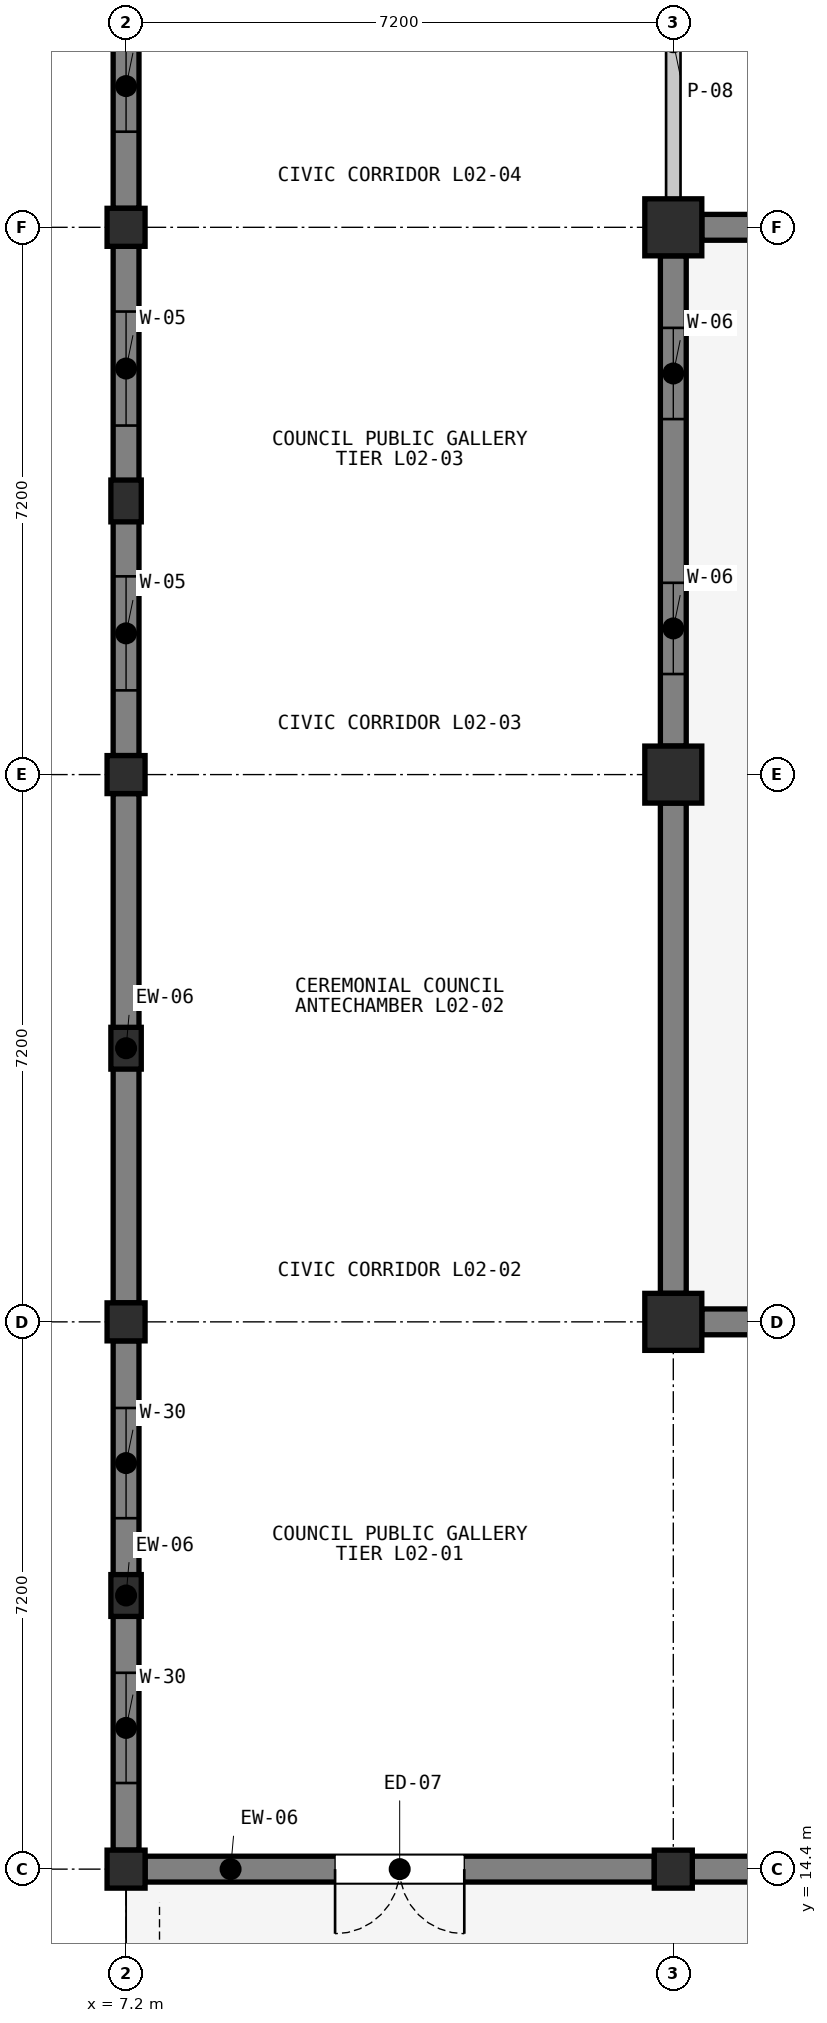
"""IFC4 building model, lengths in metres.
Left out: names, types, materials, properties, quantities, classifications, styles, units other than length and angle.
Written with IfcOpenShell. Run it as: python <this file> out.ifc"""

import sys

from ifc_helpers import new_model, si_unit, direction, frame, frame_2d, origin, origin_2d, place, context, subcontext, project, spatial, rectangle, extrude, element, fill, save


model = new_model("IFC4")
c1 = context("Model", 3, precision=1e-05, world=origin(), true_north=direction((0.0, 1.0)))
c2 = subcontext(c1, "Body", "Model", "MODEL_VIEW")
j1 = project(units=[si_unit("LENGTHUNIT", "METRE"), si_unit("PLANEANGLEUNIT", "RADIAN")], contexts=[c1])
p1 = place(None, origin())
s1 = spatial("IfcSite", under=j1, at=p1, CompositionType="ELEMENT")
p2 = place(p1, origin())
s2 = spatial("IfcBuilding", under=s1, at=p2, CompositionType="ELEMENT")
p3 = place(p2, frame((0.0, 0.0, 5.4)))
s3 = spatial("IfcBuildingStorey", under=s2, at=p3, CompositionType="ELEMENT", Elevation=5.4)
for number, where, z_axis, x_axis in (
    (1, (7.2, 14.4, 0.0), (0.0, 0.0, 1.0), (1.0, 0.0, 0.0)),
    (2, (7.2, 21.6, 0.0), (0.0, 0.0, 1.0), (1.0, 0.0, 0.0)),
    (3, (7.2, 28.8, 0.0), (0.0, 0.0, 1.0), (1.0, 0.0, 0.0)),
    (4, (7.2, 36.0, 0.0), (0.0, 0.0, 1.0), (1.0, 0.0, 0.0)),
    (5, (14.4, 14.4, 0.0), (0.0, 0.0, 1.0), (1.0, 0.0, 0.0)),
):
    element("IfcColumn", number, at=place(p3, frame(where, z_axis=z_axis, x_axis=x_axis)), inside=s3, PredefinedType="COLUMN", context=c2, shape_type="SweptSolid", body=[
        extrude(rectangle(XDim=0.5, YDim=0.5, at=origin_2d()), origin(), (0.0, 0.0, 1.0), 4.5),
    ])
for number, where, z_axis, x_axis in (
    (6, (14.4, 21.6, 0.0), (0.0, 0.0, 1.0), (1.0, 0.0, 0.0)),
    (7, (14.4, 28.8, 0.0), (0.0, 0.0, 1.0), (1.0, 0.0, 0.0)),
    (8, (14.4, 36.0, 0.0), (0.0, 0.0, 1.0), (1.0, 0.0, 0.0)),
):
    element("IfcColumn", number, at=place(p3, frame(where, z_axis=z_axis, x_axis=x_axis)), inside=s3, PredefinedType="COLUMN", context=c2, shape_type="SweptSolid", body=[
        extrude(rectangle(XDim=0.75, YDim=0.75, at=origin_2d()), origin(), (0.0, 0.0, 1.0), 4.5),
    ])
for number, where, z_axis, x_axis in (
    (9, (7.2, 18.0, 0.0), (0.0, 0.0, 1.0), (1.0, 0.0, 0.0)),
    (10, (7.2, 25.2, 0.0), (0.0, 0.0, 1.0), (1.0, 0.0, 0.0)),
    (11, (7.2, 32.4, 0.0), (0.0, 0.0, 1.0), (1.0, 0.0, 0.0)),
):
    element("IfcColumn", number, at=place(p3, frame(where, z_axis=z_axis, x_axis=x_axis)), inside=s3, PredefinedType="PILASTER", context=c2, shape_type="SweptSolid", body=[
        extrude(rectangle(XDim=0.4, YDim=0.55, at=origin_2d()), origin(), (0.0, 0.0, 1.0), 4.5),
    ])
p4 = place(p3, frame((14.15, 14.4, 0.0), z_axis=(0.0, 0.0, 1.0), x_axis=(-1.0, 0.0, 0.0)))
e12 = element("IfcWall", 12, at=p4, inside=s3, PredefinedType="SOLIDWALL", context=c2, shape_type="SweptSolid", body=[
    extrude(rectangle(XDim=6.7, YDim=0.34, at=frame_2d((3.35, 0.0))), origin(), (0.0, 0.0, 1.0), 3.698),
])
p5 = place(p4, frame((2.5, 0.0, 0.0)))
e13 = element("IfcOpeningElement", 13, at=p5, cuts=e12, PredefinedType="OPENING", context=c2, shape_type="SweptSolid", body=[
    extrude(rectangle(XDim=1.7, YDim=2.25, at=frame_2d((0.85, 1.125))), frame((0.0, 0.18, 0.0), z_axis=(0.0, -1.0, 0.0), x_axis=(1.0, 0.0, 0.0)), (0.0, 0.0, 1.0), 0.36),
])
p6 = place(p3, frame((7.2, 14.65, 0.0), z_axis=(0.0, 0.0, 1.0), x_axis=(0.0, 1.0, 0.0)))
e14 = element("IfcWall", 14, at=p6, inside=s3, PredefinedType="SOLIDWALL", context=c2, shape_type="SweptSolid", body=[
    extrude(rectangle(XDim=6.7, YDim=0.34, at=frame_2d((3.35, 0.0))), origin(), (0.0, 0.0, 1.0), 3.767),
])
p7 = place(p6, frame((0.883, 0.0, 0.95)))
e15 = element("IfcOpeningElement", 15, at=p7, cuts=e14, PredefinedType="OPENING", context=c2, shape_type="SweptSolid", body=[
    extrude(rectangle(XDim=1.45, YDim=2.15, at=frame_2d((0.725, 1.075))), frame((0.0, 0.18, 0.0), z_axis=(0.0, -1.0, 0.0), x_axis=(1.0, 0.0, 0.0)), (0.0, 0.0, 1.0), 0.36),
])
p8 = place(p6, frame((4.367, 0.0, 0.95)))
e16 = element("IfcOpeningElement", 16, at=p8, cuts=e14, PredefinedType="OPENING", context=c2, shape_type="SweptSolid", body=[
    extrude(rectangle(XDim=1.45, YDim=2.15, at=frame_2d((0.725, 1.075))), frame((0.0, 0.18, 0.0), z_axis=(0.0, -1.0, 0.0), x_axis=(1.0, 0.0, 0.0)), (0.0, 0.0, 1.0), 0.36),
])
p9 = place(p3, frame((7.2, 21.85, 0.0), z_axis=(0.0, 0.0, 1.0), x_axis=(0.0, 1.0, 0.0)))
e17 = element("IfcWall", 17, at=p9, inside=s3, PredefinedType="SOLIDWALL", context=c2, shape_type="SweptSolid", body=[
    extrude(rectangle(XDim=6.7, YDim=0.34, at=frame_2d((3.35, 0.0))), origin(), (0.0, 0.0, 1.0), 3.767),
])
p10 = place(p3, frame((14.4, 28.425, 0.0), z_axis=(0.0, 0.0, 1.0), x_axis=(0.0, -1.0, 0.0)))
e18 = element("IfcWall", 18, at=p10, inside=s3, PredefinedType="SOLIDWALL", context=c2, shape_type="SweptSolid", body=[
    extrude(rectangle(XDim=6.45, YDim=0.34, at=frame_2d((3.225, 0.0))), origin(), (0.0, 0.0, 1.0), 3.767),
])
p11 = place(p3, frame((7.2, 29.05, 0.0), z_axis=(0.0, 0.0, 1.0), x_axis=(0.0, 1.0, 0.0)))
e19 = element("IfcWall", 19, at=p11, inside=s3, PredefinedType="SOLIDWALL", context=c2, shape_type="SweptSolid", body=[
    extrude(rectangle(XDim=6.7, YDim=0.34, at=frame_2d((3.35, 0.0))), origin(), (0.0, 0.0, 1.0), 3.767),
])
p12 = place(p11, frame((0.858, 0.0, 0.95)))
e20 = element("IfcOpeningElement", 20, at=p12, cuts=e19, PredefinedType="OPENING", context=c2, shape_type="SweptSolid", body=[
    extrude(rectangle(XDim=1.5, YDim=2.4, at=frame_2d((0.75, 1.2))), frame((0.0, 0.18, 0.0), z_axis=(0.0, -1.0, 0.0), x_axis=(1.0, 0.0, 0.0)), (0.0, 0.0, 1.0), 0.36),
])
p13 = place(p11, frame((4.342, 0.0, 0.95)))
e21 = element("IfcOpeningElement", 21, at=p13, cuts=e19, PredefinedType="OPENING", context=c2, shape_type="SweptSolid", body=[
    extrude(rectangle(XDim=1.5, YDim=2.4, at=frame_2d((0.75, 1.2))), frame((0.0, 0.18, 0.0), z_axis=(0.0, -1.0, 0.0), x_axis=(1.0, 0.0, 0.0)), (0.0, 0.0, 1.0), 0.36),
])
p14 = place(p3, frame((14.4, 35.625, 0.0), z_axis=(0.0, 0.0, 1.0), x_axis=(0.0, -1.0, 0.0)))
e22 = element("IfcWall", 22, at=p14, inside=s3, PredefinedType="SOLIDWALL", context=c2, shape_type="SweptSolid", body=[
    extrude(rectangle(XDim=6.45, YDim=0.34, at=frame_2d((3.225, 0.0))), origin(), (0.0, 0.0, 1.0), 3.767),
])
p15 = place(p14, frame((0.948, 0.0, 0.95)))
e23 = element("IfcOpeningElement", 23, at=p15, cuts=e22, PredefinedType="OPENING", context=c2, shape_type="SweptSolid", body=[
    extrude(rectangle(XDim=1.2, YDim=2.4, at=frame_2d((0.6, 1.2))), frame((0.0, 0.18, 0.0), z_axis=(0.0, -1.0, 0.0), x_axis=(1.0, 0.0, 0.0)), (0.0, 0.0, 1.0), 0.36),
])
p16 = place(p14, frame((4.302, 0.0, 0.95)))
e24 = element("IfcOpeningElement", 24, at=p16, cuts=e22, PredefinedType="OPENING", context=c2, shape_type="SweptSolid", body=[
    extrude(rectangle(XDim=1.2, YDim=2.4, at=frame_2d((0.6, 1.2))), frame((0.0, 0.18, 0.0), z_axis=(0.0, -1.0, 0.0), x_axis=(1.0, 0.0, 0.0)), (0.0, 0.0, 1.0), 0.36),
])
p17 = place(p3, frame((7.2, 36.25, 0.0), z_axis=(0.0, 0.0, 1.0), x_axis=(0.0, 1.0, 0.0)))
e25 = element("IfcWall", 25, at=p17, inside=s3, PredefinedType="SOLIDWALL", context=c2, shape_type="SweptSolid", body=[
    extrude(rectangle(XDim=6.7, YDim=0.34, at=frame_2d((3.35, 0.0))), origin(), (0.0, 0.0, 1.0), 3.767),
])
p18 = place(p17, frame((1.008, 0.0, 0.95)))
e26 = element("IfcOpeningElement", 26, at=p18, cuts=e25, PredefinedType="OPENING", context=c2, shape_type="SweptSolid", body=[
    extrude(rectangle(XDim=1.2, YDim=1.7, at=frame_2d((0.6, 0.85))), frame((0.0, 0.18, 0.0), z_axis=(0.0, -1.0, 0.0), x_axis=(1.0, 0.0, 0.0)), (0.0, 0.0, 1.0), 0.36),
])
p19 = place(p17, frame((4.492, 0.0, 0.95)))
e27 = element("IfcOpeningElement", 27, at=p19, cuts=e25, PredefinedType="OPENING", context=c2, shape_type="SweptSolid", body=[
    extrude(rectangle(XDim=1.2, YDim=1.7, at=frame_2d((0.6, 0.85))), frame((0.0, 0.18, 0.0), z_axis=(0.0, -1.0, 0.0), x_axis=(1.0, 0.0, 0.0)), (0.0, 0.0, 1.0), 0.36),
])
p20 = place(p3, frame((21.35, 14.4, 0.0), z_axis=(0.0, 0.0, 1.0), x_axis=(-1.0, 0.0, 0.0)))
e28 = element("IfcWall", 28, at=p20, inside=s3, PredefinedType="SOLIDWALL", context=c2, shape_type="SweptSolid", body=[
    extrude(rectangle(XDim=6.7, YDim=0.34, at=frame_2d((3.35, 0.0))), origin(), (0.0, 0.0, 1.0), 3.698),
])
p21 = place(p3, frame((14.775, 21.6, 0.0), z_axis=(0.0, 0.0, 1.0), x_axis=(1.0, 0.0, 0.0)))
e29 = element("IfcWall", 29, at=p21, inside=s3, PredefinedType="SOLIDWALL", context=c2, shape_type="SweptSolid", body=[
    extrude(rectangle(XDim=6.45, YDim=0.34, at=frame_2d((3.225, 0.0))), origin(), (0.0, 0.0, 1.0), 3.698),
])
p22 = place(p21, frame((0.948, 0.0, 0.95)))
e30 = element("IfcOpeningElement", 30, at=p22, cuts=e29, PredefinedType="OPENING", context=c2, shape_type="SweptSolid", body=[
    extrude(rectangle(XDim=1.2, YDim=1.7, at=frame_2d((0.6, 0.85))), frame((0.0, 0.18, 0.0), z_axis=(0.0, -1.0, 0.0), x_axis=(1.0, 0.0, 0.0)), (0.0, 0.0, 1.0), 0.36),
])
p23 = place(p21, frame((4.302, 0.0, 0.95)))
e31 = element("IfcOpeningElement", 31, at=p23, cuts=e29, PredefinedType="OPENING", context=c2, shape_type="SweptSolid", body=[
    extrude(rectangle(XDim=1.2, YDim=1.7, at=frame_2d((0.6, 0.85))), frame((0.0, 0.18, 0.0), z_axis=(0.0, -1.0, 0.0), x_axis=(1.0, 0.0, 0.0)), (0.0, 0.0, 1.0), 0.36),
])
p24 = place(p3, frame((21.35, 36.0, 0.0), z_axis=(0.0, 0.0, 1.0), x_axis=(-1.0, 0.0, 0.0)))
e32 = element("IfcWall", 32, at=p24, inside=s3, PredefinedType="SOLIDWALL", context=c2, shape_type="SweptSolid", body=[
    extrude(rectangle(XDim=6.575, YDim=0.34, at=frame_2d((3.288, 0.0))), origin(), (0.0, 0.0, 1.0), 4.3),
])
p25 = place(p24, frame((0.978, 0.0, 0.95)))
e33 = element("IfcOpeningElement", 33, at=p25, cuts=e32, PredefinedType="OPENING", context=c2, shape_type="SweptSolid", body=[
    extrude(rectangle(XDim=1.2, YDim=2.4, at=frame_2d((0.6, 1.2))), frame((0.0, 0.18, 0.0), z_axis=(0.0, -1.0, 0.0), x_axis=(1.0, 0.0, 0.0)), (0.0, 0.0, 1.0), 0.36),
])
p26 = place(p24, frame((4.397, 0.0, 0.95)))
e34 = element("IfcOpeningElement", 34, at=p26, cuts=e32, PredefinedType="OPENING", context=c2, shape_type="SweptSolid", body=[
    extrude(rectangle(XDim=1.2, YDim=2.4, at=frame_2d((0.6, 1.2))), frame((0.0, 0.18, 0.0), z_axis=(0.0, -1.0, 0.0), x_axis=(1.0, 0.0, 0.0)), (0.0, 0.0, 1.0), 0.36),
])
p27 = place(p3, frame((14.4, 36.12, 0.0), z_axis=(0.0, 0.0, 1.0), x_axis=(0.0, 1.0, 0.0)))
e35 = element("IfcWall", 35, at=p27, inside=s3, PredefinedType="PARTITIONING", context=c2, shape_type="SweptSolid", body=[
    extrude(rectangle(XDim=6.8, YDim=0.19, at=frame_2d((3.4, 0.0))), origin(), (0.0, 0.0, 1.0), 3.688),
])
p28 = place(p5, origin())
e36 = element("IfcDoor", 36, at=p28, inside=s3, OperationType="DOUBLE_DOOR_SINGLE_SWING", PredefinedType="DOOR", context=c2, shape_type="SweptSolid", body=[
    extrude(rectangle(XDim=1.7, YDim=2.25, at=frame_2d((0.85, 1.125))), frame((0.0, 0.025, 0.0), z_axis=(0.0, -1.0, 0.0), x_axis=(1.0, 0.0, 0.0)), (0.0, 0.0, 1.0), 0.05),
])
fill(e13, e36)
p29 = place(p7, origin())
e37 = element("IfcWindow", 37, at=p29, inside=s3, PartitioningType="SINGLE_PANEL", PredefinedType="WINDOW", context=c2, shape_type="SweptSolid", body=[
    extrude(rectangle(XDim=1.45, YDim=2.15, at=frame_2d((0.725, 1.075))), frame((0.0, 0.03, 0.0), z_axis=(0.0, -1.0, 0.0), x_axis=(1.0, 0.0, 0.0)), (0.0, 0.0, 1.0), 0.06),
])
fill(e15, e37)
p30 = place(p8, origin())
e38 = element("IfcWindow", 38, at=p30, inside=s3, PartitioningType="SINGLE_PANEL", PredefinedType="WINDOW", context=c2, shape_type="SweptSolid", body=[
    extrude(rectangle(XDim=1.45, YDim=2.15, at=frame_2d((0.725, 1.075))), frame((0.0, 0.03, 0.0), z_axis=(0.0, -1.0, 0.0), x_axis=(1.0, 0.0, 0.0)), (0.0, 0.0, 1.0), 0.06),
])
fill(e16, e38)
p31 = place(p12, origin())
e39 = element("IfcWindow", 39, at=p31, inside=s3, PartitioningType="SINGLE_PANEL", PredefinedType="WINDOW", context=c2, shape_type="SweptSolid", body=[
    extrude(rectangle(XDim=1.5, YDim=2.4, at=frame_2d((0.75, 1.2))), frame((0.0, 0.03, 0.0), z_axis=(0.0, -1.0, 0.0), x_axis=(1.0, 0.0, 0.0)), (0.0, 0.0, 1.0), 0.06),
])
fill(e20, e39)
p32 = place(p13, origin())
e40 = element("IfcWindow", 40, at=p32, inside=s3, PartitioningType="SINGLE_PANEL", PredefinedType="WINDOW", context=c2, shape_type="SweptSolid", body=[
    extrude(rectangle(XDim=1.5, YDim=2.4, at=frame_2d((0.75, 1.2))), frame((0.0, 0.03, 0.0), z_axis=(0.0, -1.0, 0.0), x_axis=(1.0, 0.0, 0.0)), (0.0, 0.0, 1.0), 0.06),
])
fill(e21, e40)
p33 = place(p15, origin())
e41 = element("IfcWindow", 41, at=p33, inside=s3, PartitioningType="SINGLE_PANEL", PredefinedType="WINDOW", context=c2, shape_type="SweptSolid", body=[
    extrude(rectangle(XDim=1.2, YDim=2.4, at=frame_2d((0.6, 1.2))), frame((0.0, 0.03, 0.0), z_axis=(0.0, -1.0, 0.0), x_axis=(1.0, 0.0, 0.0)), (0.0, 0.0, 1.0), 0.06),
])
fill(e23, e41)
p34 = place(p16, origin())
e42 = element("IfcWindow", 42, at=p34, inside=s3, PartitioningType="SINGLE_PANEL", PredefinedType="WINDOW", context=c2, shape_type="SweptSolid", body=[
    extrude(rectangle(XDim=1.2, YDim=2.4, at=frame_2d((0.6, 1.2))), frame((0.0, 0.03, 0.0), z_axis=(0.0, -1.0, 0.0), x_axis=(1.0, 0.0, 0.0)), (0.0, 0.0, 1.0), 0.06),
])
fill(e24, e42)
p35 = place(p18, origin())
e43 = element("IfcWindow", 43, at=p35, inside=s3, PartitioningType="SINGLE_PANEL", PredefinedType="WINDOW", context=c2, shape_type="SweptSolid", body=[
    extrude(rectangle(XDim=1.2, YDim=1.7, at=frame_2d((0.6, 0.85))), frame((0.0, 0.03, 0.0), z_axis=(0.0, -1.0, 0.0), x_axis=(1.0, 0.0, 0.0)), (0.0, 0.0, 1.0), 0.06),
])
fill(e26, e43)
save(model, sys.argv[1])
